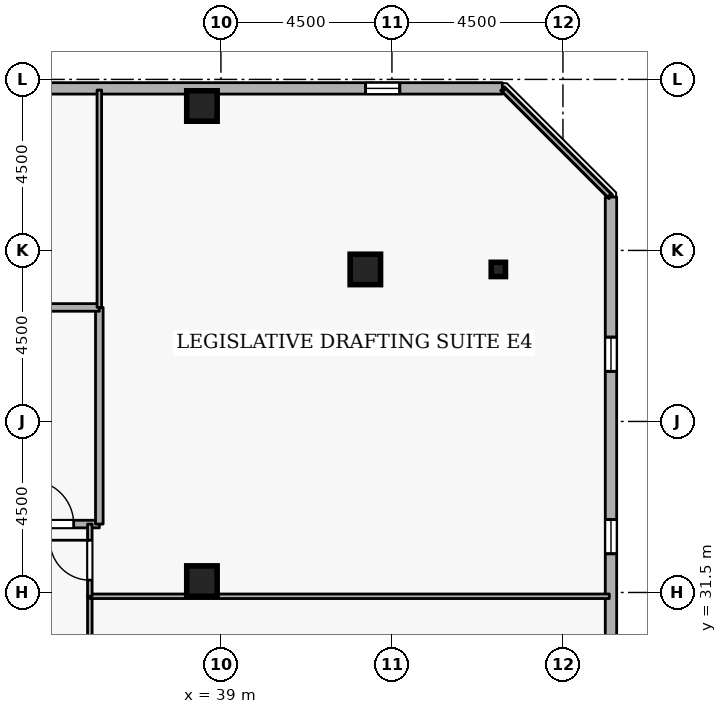
"""IFC4 building model, lengths in metres.
Left out: names, types, materials, properties, quantities, classifications, styles, units other than length and angle.
Written with IfcOpenShell. Run it as: python <this file> out.ifc"""

import sys

from ifc_helpers import new_model, si_unit, direction, frame, frame_2d, origin, origin_2d, place, context, subcontext, project, spatial, rectangle, i_section, extrude, element, fill, save


model = new_model("IFC4")
c1 = context("Model", 3, precision=1e-05, world=origin(), true_north=direction((0.0, 1.0)))
c2 = subcontext(c1, "Body", "Model", "MODEL_VIEW")
j1 = project(units=[si_unit("LENGTHUNIT", "METRE"), si_unit("PLANEANGLEUNIT", "RADIAN")], contexts=[c1])
p1 = place(None, origin())
s1 = spatial("IfcSite", under=j1, at=p1, CompositionType="ELEMENT")
p2 = place(p1, origin())
s2 = spatial("IfcBuilding", under=s1, at=p2, CompositionType="ELEMENT")
p3 = place(p2, frame((0.0, 0.0, 272.7)))
s3 = spatial("IfcBuildingStorey", under=s2, at=p3, CompositionType="ELEMENT", Elevation=272.7)
for number, where, z_axis, x_axis in (
    (1, (42.8, 40.0, 0.0), (0.0, 0.0, 1.0), (1.0, 0.0, 0.0)),
    (2, (38.5, 44.3, 0.0), (0.0, 0.0, 1.0), (1.0, 0.0, 0.0)),
    (3, (38.5, 31.8, 0.0), (0.0, 0.0, 1.0), (1.0, 0.0, 0.0)),
):
    element("IfcColumn", number, at=place(p3, frame(where, z_axis=z_axis, x_axis=x_axis)), inside=s3, PredefinedType="COLUMN", context=c2, shape_type="SweptSolid", body=[
        extrude(rectangle(XDim=0.8, YDim=0.8, at=origin_2d()), origin(), (0.0, 0.0, 1.0), 3.6),
    ])
p4 = place(p3, frame((46.3, 40.0, 0.0), z_axis=(0.0, 0.0, 1.0), x_axis=(1.0, 0.0, 0.0)))
e4 = element("IfcColumn", 4, at=p4, inside=s3, PredefinedType="COLUMN", context=c2, shape_type="SweptSolid", body=[
    extrude(i_section(OverallWidth=0.375, OverallDepth=0.375, WebThickness=0.017, FlangeThickness=0.027, FilletRadius=0.015, at=origin_2d()), origin(), (0.0, 0.0, 1.0), 3.6),
])
p5 = place(p3, frame((49.265, 5.819, 0.0), z_axis=(0.0, 0.0, 1.0), x_axis=(-2.7061402e-05, 0.999999999634, 0.0)))
e5 = element("IfcWall", 5, at=p5, inside=s3, PredefinedType="STANDARD", context=c2, shape_type="SweptSolid", body=[
    extrude(rectangle(XDim=36.087, YDim=0.3, at=frame_2d((18.043, 0.0))), origin(), (0.0, 0.0, 1.0), 2.7),
])
p6 = place(p5, frame((2.7, 0.0, 0.72)))
e6 = element("IfcOpeningElement", 6, at=p6, cuts=e5, PredefinedType="OPENING", context=c2, shape_type="SweptSolid", body=[
    extrude(rectangle(XDim=0.9, YDim=1.75, at=frame_2d((0.45, 0.875))), frame((0.0, 0.16, 0.0), z_axis=(0.0, -1.0, 0.0), x_axis=(1.0, 0.0, 0.0)), (0.0, 0.0, 1.0), 0.32),
])
p7 = place(p5, frame((7.5, 0.0, 0.72)))
e7 = element("IfcOpeningElement", 7, at=p7, cuts=e5, PredefinedType="OPENING", context=c2, shape_type="SweptSolid", body=[
    extrude(rectangle(XDim=0.9, YDim=1.75, at=frame_2d((0.45, 0.875))), frame((0.0, 0.16, 0.0), z_axis=(0.0, -1.0, 0.0), x_axis=(1.0, 0.0, 0.0)), (0.0, 0.0, 1.0), 0.32),
])
p8 = place(p5, frame((12.3, 0.0, 0.72)))
e8 = element("IfcOpeningElement", 8, at=p8, cuts=e5, PredefinedType="OPENING", context=c2, shape_type="SweptSolid", body=[
    extrude(rectangle(XDim=0.9, YDim=1.75, at=frame_2d((0.45, 0.875))), frame((0.0, 0.16, 0.0), z_axis=(0.0, -1.0, 0.0), x_axis=(1.0, 0.0, 0.0)), (0.0, 0.0, 1.0), 0.32),
])
p9 = place(p5, frame((17.1, 0.0, 0.72)))
e9 = element("IfcOpeningElement", 9, at=p9, cuts=e5, PredefinedType="OPENING", context=c2, shape_type="SweptSolid", body=[
    extrude(rectangle(XDim=0.9, YDim=1.75, at=frame_2d((0.45, 0.875))), frame((0.0, 0.16, 0.0), z_axis=(0.0, -1.0, 0.0), x_axis=(1.0, 0.0, 0.0)), (0.0, 0.0, 1.0), 0.32),
])
p10 = place(p5, frame((21.9, 0.0, 0.72)))
e10 = element("IfcOpeningElement", 10, at=p10, cuts=e5, PredefinedType="OPENING", context=c2, shape_type="SweptSolid", body=[
    extrude(rectangle(XDim=0.9, YDim=1.75, at=frame_2d((0.45, 0.875))), frame((0.0, 0.16, 0.0), z_axis=(0.0, -1.0, 0.0), x_axis=(1.0, 0.0, 0.0)), (0.0, 0.0, 1.0), 0.32),
])
p11 = place(p5, frame((26.7, 0.0, 0.72)))
e11 = element("IfcOpeningElement", 11, at=p11, cuts=e5, PredefinedType="OPENING", context=c2, shape_type="SweptSolid", body=[
    extrude(rectangle(XDim=0.9, YDim=1.75, at=frame_2d((0.45, 0.875))), frame((0.0, 0.16, 0.0), z_axis=(0.0, -1.0, 0.0), x_axis=(1.0, 0.0, 0.0)), (0.0, 0.0, 1.0), 0.32),
])
p12 = place(p5, frame((31.5, 0.0, 0.72)))
e12 = element("IfcOpeningElement", 12, at=p12, cuts=e5, PredefinedType="OPENING", context=c2, shape_type="SweptSolid", body=[
    extrude(rectangle(XDim=0.9, YDim=1.75, at=frame_2d((0.45, 0.875))), frame((0.0, 0.16, 0.0), z_axis=(0.0, -1.0, 0.0), x_axis=(1.0, 0.0, 0.0)), (0.0, 0.0, 1.0), 0.32),
])
p13 = place(p3, frame((46.406, 44.764, 0.0), z_axis=(0.0, 0.0, 1.0), x_axis=(-0.999999999634, 2.7061402e-05, 0.0)))
e13 = element("IfcWall", 13, at=p13, inside=s3, PredefinedType="STANDARD", context=c2, shape_type="SweptSolid", body=[
    extrude(rectangle(XDim=36.087, YDim=0.3, at=frame_2d((18.043, 0.0))), origin(), (0.0, 0.0, 1.0), 2.7),
])
p14 = place(p13, frame((2.7, 0.0, 0.72)))
e14 = element("IfcOpeningElement", 14, at=p14, cuts=e13, PredefinedType="OPENING", context=c2, shape_type="SweptSolid", body=[
    extrude(rectangle(XDim=0.9, YDim=1.75, at=frame_2d((0.45, 0.875))), frame((0.0, 0.16, 0.0), z_axis=(0.0, -1.0, 0.0), x_axis=(1.0, 0.0, 0.0)), (0.0, 0.0, 1.0), 0.32),
])
p15 = place(p13, frame((12.3, 0.0, 0.72)))
e15 = element("IfcOpeningElement", 15, at=p15, cuts=e13, PredefinedType="OPENING", context=c2, shape_type="SweptSolid", body=[
    extrude(rectangle(XDim=0.9, YDim=1.75, at=frame_2d((0.45, 0.875))), frame((0.0, 0.16, 0.0), z_axis=(0.0, -1.0, 0.0), x_axis=(1.0, 0.0, 0.0)), (0.0, 0.0, 1.0), 0.32),
])
p16 = place(p13, frame((17.1, 0.0, 0.72)))
e16 = element("IfcOpeningElement", 16, at=p16, cuts=e13, PredefinedType="OPENING", context=c2, shape_type="SweptSolid", body=[
    extrude(rectangle(XDim=0.9, YDim=1.75, at=frame_2d((0.45, 0.875))), frame((0.0, 0.16, 0.0), z_axis=(0.0, -1.0, 0.0), x_axis=(1.0, 0.0, 0.0)), (0.0, 0.0, 1.0), 0.32),
])
p17 = place(p13, frame((26.7, 0.0, 0.72)))
e17 = element("IfcOpeningElement", 17, at=p17, cuts=e13, PredefinedType="OPENING", context=c2, shape_type="SweptSolid", body=[
    extrude(rectangle(XDim=0.9, YDim=1.75, at=frame_2d((0.45, 0.875))), frame((0.0, 0.16, 0.0), z_axis=(0.0, -1.0, 0.0), x_axis=(1.0, 0.0, 0.0)), (0.0, 0.0, 1.0), 0.32),
])
p18 = place(p13, frame((31.5, 0.0, 0.72)))
e18 = element("IfcOpeningElement", 18, at=p18, cuts=e13, PredefinedType="OPENING", context=c2, shape_type="SweptSolid", body=[
    extrude(rectangle(XDim=0.9, YDim=1.75, at=frame_2d((0.45, 0.875))), frame((0.0, 0.16, 0.0), z_axis=(0.0, -1.0, 0.0), x_axis=(1.0, 0.0, 0.0)), (0.0, 0.0, 1.0), 0.32),
])
p19 = place(p3, frame((33.3, 33.3, 0.0), z_axis=(0.0, 0.0, 1.0), x_axis=(1.0, 0.0, 0.0)))
e19 = element("IfcWall", 19, at=p19, inside=s3, PredefinedType="STANDARD", context=c2, shape_type="SweptSolid", body=[
    extrude(rectangle(XDim=2.5, YDim=0.2, at=frame_2d((1.25, 0.0))), origin(), (0.0, 0.0, 1.0), 3.34),
])
p20 = place(p19, frame((0.675, 0.0, 0.0)))
e20 = element("IfcOpeningElement", 20, at=p20, cuts=e19, PredefinedType="OPENING", context=c2, shape_type="SweptSolid", body=[
    extrude(rectangle(XDim=1.15, YDim=2.1, at=frame_2d((0.575, 1.05))), frame((0.0, 0.11, 0.0), z_axis=(0.0, -1.0, 0.0), x_axis=(1.0, 0.0, 0.0)), (0.0, 0.0, 1.0), 0.22),
])
p21 = place(p3, frame((35.8, 33.3, 0.0), z_axis=(0.0, 0.0, 1.0), x_axis=(0.0, 1.0, 0.0)))
e21 = element("IfcWall", 21, at=p21, inside=s3, PredefinedType="STANDARD", context=c2, shape_type="SweptSolid", body=[
    extrude(rectangle(XDim=5.7, YDim=0.2, at=frame_2d((2.85, 0.0))), origin(), (0.0, 0.0, 1.0), 3.34),
])
p22 = place(p3, frame((35.8, 39.0, 0.0), z_axis=(0.0, 0.0, 1.0), x_axis=(-1.0, 0.0, 0.0)))
e22 = element("IfcWall", 22, at=p22, inside=s3, PredefinedType="STANDARD", context=c2, shape_type="SweptSolid", body=[
    extrude(rectangle(XDim=2.5, YDim=0.2, at=frame_2d((1.25, 0.0))), origin(), (0.0, 0.0, 1.0), 3.34),
])
p23 = place(p3, frame((35.55, 26.6, 0.0), z_axis=(0.0, 0.0, 1.0), x_axis=(0.0, 1.0, 0.0)))
e23 = element("IfcWall", 23, at=p23, inside=s3, PredefinedType="PARTITIONING", context=c2, shape_type="SweptSolid", body=[
    extrude(rectangle(XDim=4.8, YDim=0.12, at=frame_2d((2.4, 0.0))), origin(), (0.0, 0.0, 1.0), 3.34),
])
p24 = place(p23, frame((1.925, 0.0, 0.0)))
e24 = element("IfcOpeningElement", 24, at=p24, cuts=e23, PredefinedType="OPENING", context=c2, shape_type="SweptSolid", body=[
    extrude(rectangle(XDim=0.95, YDim=2.1, at=frame_2d((0.475, 1.05))), frame((0.0, 0.07, 0.0), z_axis=(0.0, -1.0, 0.0), x_axis=(1.0, 0.0, 0.0)), (0.0, 0.0, 1.0), 0.14),
])
p25 = place(p3, frame((35.55, 31.4, 0.0), z_axis=(0.0, 0.0, 1.0), x_axis=(1.0, 0.0, 0.0)))
e25 = element("IfcWall", 25, at=p25, inside=s3, PredefinedType="PARTITIONING", context=c2, shape_type="SweptSolid", body=[
    extrude(rectangle(XDim=13.67, YDim=0.12, at=frame_2d((6.835, 0.0))), origin(), (0.0, 0.0, 1.0), 3.34),
])
p26 = place(p3, frame((35.8, 39.0, 0.0), z_axis=(0.0, 0.0, 1.0), x_axis=(0.0, 1.0, 0.0)))
e26 = element("IfcWall", 26, at=p26, inside=s3, PredefinedType="PARTITIONING", context=c2, shape_type="SweptSolid", body=[
    extrude(rectangle(XDim=5.72, YDim=0.12, at=frame_2d((2.86, 0.0))), origin(), (0.0, 0.0, 1.0), 3.34),
])
p27 = place(p3, frame((46.448, 44.72, 0.0), z_axis=(0.0, 0.0, 1.0), x_axis=(0.707106781187, -0.707106781187, 0.0)))
e27 = element("IfcWall", 27, at=p27, inside=s3, PredefinedType="PARTITIONING", context=c2, shape_type="SweptSolid", body=[
    extrude(rectangle(XDim=3.919, YDim=0.12, at=frame_2d((1.96, 0.0))), origin(), (0.0, 0.0, 1.0), 3.34),
])
p28 = place(p3, frame((35.55, 31.4, 0.0), z_axis=(0.0, 0.0, 1.0), x_axis=(0.0, 1.0, 0.0)))
e28 = element("IfcWall", 28, at=p28, inside=s3, PredefinedType="PARTITIONING", context=c2, shape_type="SweptSolid", body=[
    extrude(rectangle(XDim=1.9, YDim=0.12, at=frame_2d((0.95, 0.0))), origin(), (0.0, 0.0, 1.0), 3.34),
])
p29 = place(p28, frame((0.425, 0.0, 0.0)))
e29 = element("IfcOpeningElement", 29, at=p29, cuts=e28, PredefinedType="OPENING", context=c2, shape_type="SweptSolid", body=[
    extrude(rectangle(XDim=1.05, YDim=2.1, at=frame_2d((0.525, 1.05))), frame((0.0, 0.07, 0.0), z_axis=(0.0, -1.0, 0.0), x_axis=(1.0, 0.0, 0.0)), (0.0, 0.0, 1.0), 0.14),
])
p30 = place(p11, origin())
e30 = element("IfcWindow", 30, at=p30, inside=s3, PartitioningType="SINGLE_PANEL", PredefinedType="WINDOW", context=c2, shape_type="SweptSolid", body=[
    extrude(rectangle(XDim=0.9, YDim=1.75, at=frame_2d((0.45, 0.875))), frame((0.0, 0.03, 0.0), z_axis=(0.0, -1.0, 0.0), x_axis=(1.0, 0.0, 0.0)), (0.0, 0.0, 1.0), 0.06),
])
fill(e11, e30)
p31 = place(p12, origin())
e31 = element("IfcWindow", 31, at=p31, inside=s3, PartitioningType="SINGLE_PANEL", PredefinedType="WINDOW", context=c2, shape_type="SweptSolid", body=[
    extrude(rectangle(XDim=0.9, YDim=1.75, at=frame_2d((0.45, 0.875))), frame((0.0, 0.03, 0.0), z_axis=(0.0, -1.0, 0.0), x_axis=(1.0, 0.0, 0.0)), (0.0, 0.0, 1.0), 0.06),
])
fill(e12, e31)
p32 = place(p14, origin())
e32 = element("IfcWindow", 32, at=p32, inside=s3, PartitioningType="SINGLE_PANEL", PredefinedType="WINDOW", context=c2, shape_type="SweptSolid", body=[
    extrude(rectangle(XDim=0.9, YDim=1.75, at=frame_2d((0.45, 0.875))), frame((0.0, 0.03, 0.0), z_axis=(0.0, -1.0, 0.0), x_axis=(1.0, 0.0, 0.0)), (0.0, 0.0, 1.0), 0.06),
])
fill(e14, e32)
p33 = place(p20, origin())
e33 = element("IfcDoor", 33, at=p33, inside=s3, OperationType="SINGLE_SWING_LEFT", PredefinedType="DOOR", context=c2, shape_type="SweptSolid", body=[
    extrude(rectangle(XDim=1.15, YDim=2.1, at=frame_2d((0.575, 1.05))), frame((0.0, 0.025, 0.0), z_axis=(0.0, -1.0, 0.0), x_axis=(1.0, 0.0, 0.0)), (0.0, 0.0, 1.0), 0.05),
])
fill(e20, e33)
p34 = place(p29, origin())
e34 = element("IfcDoor", 34, at=p34, inside=s3, OperationType="SINGLE_SWING_RIGHT", PredefinedType="DOOR", context=c2, shape_type="SweptSolid", body=[
    extrude(rectangle(XDim=1.05, YDim=2.1, at=frame_2d((0.525, 1.05))), frame((0.0, 0.025, 0.0), z_axis=(0.0, -1.0, 0.0), x_axis=(1.0, 0.0, 0.0)), (0.0, 0.0, 1.0), 0.05),
])
fill(e29, e34)
save(model, sys.argv[1])
